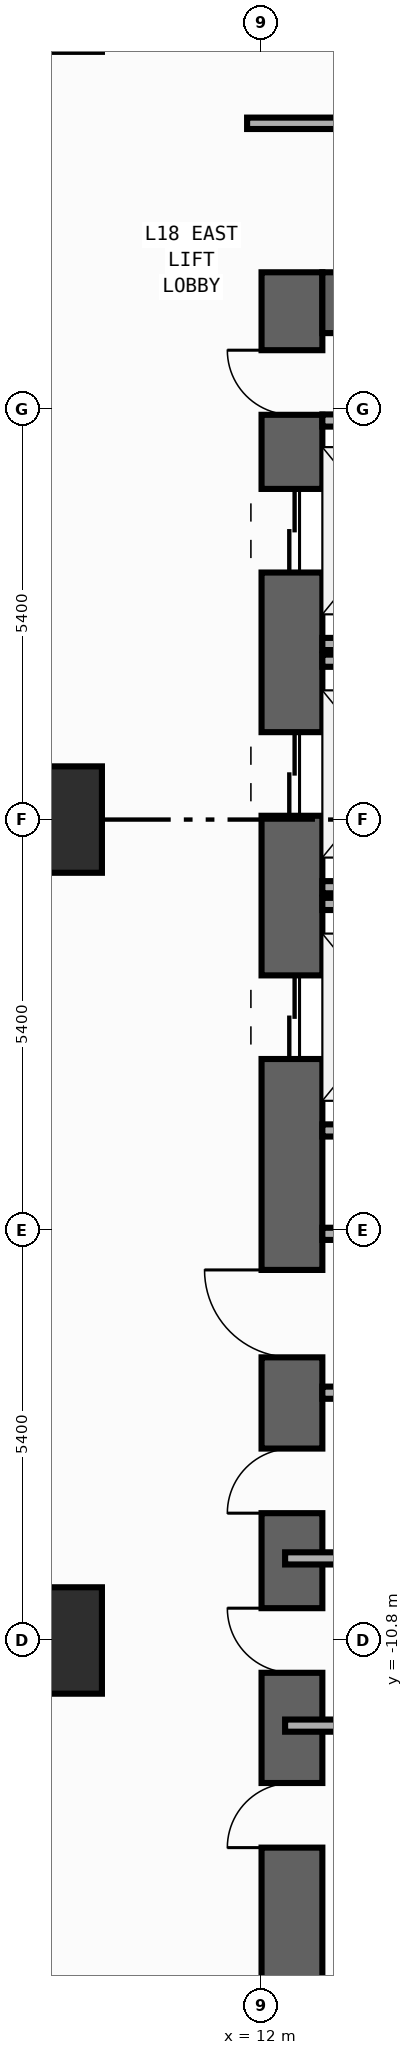
"""IFC4 building model, lengths in metres.
Left out: names, types, materials, properties, quantities, classifications, styles, units other than length and angle.
Written with IfcOpenShell. Run it as: python <this file> out.ifc"""

import sys

from ifc_helpers import new_model, si_unit, direction, frame, frame_2d, origin, origin_2d, place, context, subcontext, project, spatial, rectangle, extrude, element, fill, save


model = new_model("IFC4")
c1 = context("Model", 3, precision=1e-05, world=origin(), true_north=direction((0.0, 1.0)))
c2 = subcontext(c1, "Body", "Model", "MODEL_VIEW")
j1 = project(units=[si_unit("LENGTHUNIT", "METRE"), si_unit("PLANEANGLEUNIT", "RADIAN")], contexts=[c1])
p1 = place(None, origin())
s1 = spatial("IfcSite", under=j1, at=p1, CompositionType="ELEMENT")
p2 = place(p1, origin())
s2 = spatial("IfcBuilding", under=s1, at=p2, CompositionType="ELEMENT")
p3 = place(p2, frame((0.0, 0.0, 76.4)))
s3 = spatial("IfcBuildingStorey", under=s2, at=p3, CompositionType="ELEMENT", Elevation=76.4)
p4 = place(p3, frame((12.4, -19.8, 0.0), z_axis=(0.0, 0.0, 1.0), x_axis=(0.0, 1.0, 0.0)))
e1 = element("IfcWall", 1, at=p4, inside=s3, PredefinedType="SHEAR", context=c2, shape_type="SweptSolid", body=[
    extrude(rectangle(XDim=27.0, YDim=0.8, at=frame_2d((13.5, 0.0))), origin(), (0.0, 0.0, 1.0), 3.94),
])
p5 = place(p4, frame((23.05, 0.0, 0.0)))
e2 = element("IfcOpeningElement", 2, at=p5, cuts=e1, PredefinedType="OPENING", context=c2, shape_type="SweptSolid", body=[
    extrude(rectangle(XDim=1.1, YDim=2.2, at=frame_2d((0.55, 1.1))), frame((0.0, 0.41, 0.0), z_axis=(0.0, -1.0, 0.0), x_axis=(1.0, 0.0, 0.0)), (0.0, 0.0, 1.0), 0.82),
])
p6 = place(p4, frame((19.85, 0.0, 0.0)))
e3 = element("IfcOpeningElement", 3, at=p6, cuts=e1, PredefinedType="OPENING", context=c2, shape_type="SweptSolid", body=[
    extrude(rectangle(XDim=1.1, YDim=2.2, at=frame_2d((0.55, 1.1))), frame((0.0, 0.41, 0.0), z_axis=(0.0, -1.0, 0.0), x_axis=(1.0, 0.0, 0.0)), (0.0, 0.0, 1.0), 0.82),
])
p7 = place(p4, frame((16.65, 0.0, 0.0)))
e4 = element("IfcOpeningElement", 4, at=p7, cuts=e1, PredefinedType="OPENING", context=c2, shape_type="SweptSolid", body=[
    extrude(rectangle(XDim=1.1, YDim=2.2, at=frame_2d((0.55, 1.1))), frame((0.0, 0.41, 0.0), z_axis=(0.0, -1.0, 0.0), x_axis=(1.0, 0.0, 0.0)), (0.0, 0.0, 1.0), 0.82),
])
p8 = place(p4, frame((6.275, 0.0, 0.0)))
e5 = element("IfcOpeningElement", 5, at=p8, cuts=e1, PredefinedType="OPENING", context=c2, shape_type="SweptSolid", body=[
    extrude(rectangle(XDim=0.85, YDim=2.1, at=frame_2d((0.425, 1.05))), frame((0.0, 0.41, 0.0), z_axis=(0.0, -1.0, 0.0), x_axis=(1.0, 0.0, 0.0)), (0.0, 0.0, 1.0), 0.82),
])
p9 = place(p4, frame((8.575, 0.0, 0.0)))
e6 = element("IfcOpeningElement", 6, at=p9, cuts=e1, PredefinedType="OPENING", context=c2, shape_type="SweptSolid", body=[
    extrude(rectangle(XDim=0.85, YDim=2.1, at=frame_2d((0.425, 1.05))), frame((0.0, 0.41, 0.0), z_axis=(0.0, -1.0, 0.0), x_axis=(1.0, 0.0, 0.0)), (0.0, 0.0, 1.0), 0.82),
])
p10 = place(p4, frame((10.675, 0.0, 0.0)))
e7 = element("IfcOpeningElement", 7, at=p10, cuts=e1, PredefinedType="OPENING", context=c2, shape_type="SweptSolid", body=[
    extrude(rectangle(XDim=0.85, YDim=2.1, at=frame_2d((0.425, 1.05))), frame((0.0, 0.41, 0.0), z_axis=(0.0, -1.0, 0.0), x_axis=(1.0, 0.0, 0.0)), (0.0, 0.0, 1.0), 0.82),
])
p11 = place(p4, frame((12.725, 0.0, 0.0)))
e8 = element("IfcOpeningElement", 8, at=p11, cuts=e1, PredefinedType="OPENING", context=c2, shape_type="SweptSolid", body=[
    extrude(rectangle(XDim=1.15, YDim=2.2, at=frame_2d((0.575, 1.1))), frame((0.0, 0.41, 0.0), z_axis=(0.0, -1.0, 0.0), x_axis=(1.0, 0.0, 0.0)), (0.0, 0.0, 1.0), 0.82),
])
p12 = place(p4, frame((25.125, 0.0, 0.0)))
e9 = element("IfcOpeningElement", 9, at=p12, cuts=e1, PredefinedType="OPENING", context=c2, shape_type="SweptSolid", body=[
    extrude(rectangle(XDim=0.85, YDim=2.1, at=frame_2d((0.425, 1.05))), frame((0.0, 0.41, 0.0), z_axis=(0.0, -1.0, 0.0), x_axis=(1.0, 0.0, 0.0)), (0.0, 0.0, 1.0), 0.82),
])
p13 = place(p3, frame((12.8, 6.8, 0.0), z_axis=(0.0, 0.0, 1.0), x_axis=(1.0, 0.0, 0.0)))
e10 = element("IfcWall", 10, at=p13, inside=s3, PredefinedType="SHEAR", context=c2, shape_type="SweptSolid", body=[
    extrude(rectangle(XDim=6.8, YDim=0.8, at=frame_2d((3.4, 0.0))), origin(), (0.0, 0.0, 1.0), 3.94),
])
for number, where, z_axis, x_axis in (
    (11, (9.2, -10.8, 0.0), (0.0, 0.0, 1.0), (1.0, 0.0, 0.0)),
    (12, (9.2, 0.0, 0.0), (0.0, 0.0, 1.0), (1.0, 0.0, 0.0)),
):
    element("IfcColumn", number, at=place(p3, frame(where, z_axis=z_axis, x_axis=x_axis)), inside=s3, PredefinedType="COLUMN", context=c2, shape_type="SweptSolid", body=[
        extrude(rectangle(XDim=1.4, YDim=1.4, at=origin_2d()), origin(), (0.0, 0.0, 1.0), 4.2),
    ])
for number, where, z_axis, x_axis in (
    (13, (12.8, 2.31, 0.0), (0.0, 0.0, 1.0), (1.0, 0.0, 0.0)),
    (14, (12.8, -0.89, 0.0), (0.0, 0.0, 1.0), (1.0, 0.0, 0.0)),
    (15, (12.8, 2.09, 0.0), (0.0, 0.0, 1.0), (1.0, 0.0, 0.0)),
    (16, (12.8, -4.09, 0.0), (0.0, 0.0, 1.0), (1.0, 0.0, 0.0)),
    (17, (12.8, -1.11, 0.0), (0.0, 0.0, 1.0), (1.0, 0.0, 0.0)),
):
    element("IfcWall", number, at=place(p3, frame(where, z_axis=z_axis, x_axis=x_axis)), inside=s3, PredefinedType="STANDARD", context=c2, shape_type="SweptSolid", body=[
        extrude(rectangle(XDim=2.19, YDim=0.16, at=frame_2d((1.095, 0.0))), origin(), (0.0, 0.0, 1.0), 3.94),
    ])
for number, where, z_axis, x_axis in (
    (18, (12.8, -5.45, 0.0), (0.0, 0.0, 1.0), (1.0, 0.0, 0.0)),
    (19, (12.8, -7.54, 0.0), (0.0, 0.0, 1.0), (1.0, 0.0, 0.0)),
    (20, (12.8, 5.25, 0.0), (0.0, 0.0, 1.0), (1.0, 0.0, 0.0)),
):
    element("IfcWall", number, at=place(p3, frame(where, z_axis=z_axis, x_axis=x_axis)), inside=s3, PredefinedType="STANDARD", context=c2, shape_type="SweptSolid", body=[
        extrude(rectangle(XDim=2.6, YDim=0.16, at=frame_2d((1.3, 0.0))), origin(), (0.0, 0.0, 1.0), 3.94),
    ])
for number, where, z_axis, x_axis in (
    (21, (12.31, -11.92, 0.0), (0.0, 0.0, 1.0), (1.0, 0.0, 0.0)),
    (22, (12.31, -9.72, 0.0), (0.0, 0.0, 1.0), (1.0, 0.0, 0.0)),
):
    element("IfcWall", number, at=place(p3, frame(where, z_axis=z_axis, x_axis=x_axis)), inside=s3, PredefinedType="PARTITIONING", context=c2, shape_type="SweptSolid", body=[
        extrude(rectangle(XDim=3.065, YDim=0.16, at=frame_2d((1.532, 0.0))), origin(), (0.0, 0.0, 1.0), 3.94),
    ])
p14 = place(p3, frame((11.81, 9.16, 0.0), z_axis=(0.0, 0.0, 1.0), x_axis=(1.0, 0.0, 0.0)))
e23 = element("IfcWall", 23, at=p14, inside=s3, PredefinedType="PARTITIONING", context=c2, shape_type="SweptSolid", body=[
    extrude(rectangle(XDim=8.83, YDim=0.15, at=frame_2d((4.415, 0.0))), origin(), (0.0, 0.0, 1.0), 3.94),
])
p15 = place(p14, frame((5.067, 0.0, 0.0)))
e24 = element("IfcOpeningElement", 24, at=p15, cuts=e23, PredefinedType="OPENING", context=c2, shape_type="SweptSolid", body=[
    extrude(rectangle(XDim=0.9, YDim=2.15, at=frame_2d((0.45, 1.075))), frame((0.0, 0.085, 0.0), z_axis=(0.0, -1.0, 0.0), x_axis=(1.0, 0.0, 0.0)), (0.0, 0.0, 1.0), 0.17),
])
p16 = place(p5, origin())
e25 = element("IfcDoor", 25, at=p16, inside=s3, OperationType="DOUBLE_DOOR_SLIDING", PredefinedType="DOOR", context=c2, shape_type="SweptSolid", body=[
    extrude(rectangle(XDim=1.1, YDim=2.2, at=frame_2d((0.55, 1.1))), frame((0.0, 0.025, 0.0), z_axis=(0.0, -1.0, 0.0), x_axis=(1.0, 0.0, 0.0)), (0.0, 0.0, 1.0), 0.05),
])
fill(e2, e25)
p17 = place(p6, origin())
e26 = element("IfcDoor", 26, at=p17, inside=s3, OperationType="DOUBLE_DOOR_SLIDING", PredefinedType="DOOR", context=c2, shape_type="SweptSolid", body=[
    extrude(rectangle(XDim=1.1, YDim=2.2, at=frame_2d((0.55, 1.1))), frame((0.0, 0.025, 0.0), z_axis=(0.0, -1.0, 0.0), x_axis=(1.0, 0.0, 0.0)), (0.0, 0.0, 1.0), 0.05),
])
fill(e3, e26)
p18 = place(p7, origin())
e27 = element("IfcDoor", 27, at=p18, inside=s3, OperationType="DOUBLE_DOOR_SLIDING", PredefinedType="DOOR", context=c2, shape_type="SweptSolid", body=[
    extrude(rectangle(XDim=1.1, YDim=2.2, at=frame_2d((0.55, 1.1))), frame((0.0, 0.025, 0.0), z_axis=(0.0, -1.0, 0.0), x_axis=(1.0, 0.0, 0.0)), (0.0, 0.0, 1.0), 0.05),
])
fill(e4, e27)
p19 = place(p8, origin())
e28 = element("IfcDoor", 28, at=p19, inside=s3, OperationType="SINGLE_SWING_LEFT", PredefinedType="DOOR", context=c2, shape_type="SweptSolid", body=[
    extrude(rectangle(XDim=0.85, YDim=2.1, at=frame_2d((0.425, 1.05))), frame((0.0, 0.025, 0.0), z_axis=(0.0, -1.0, 0.0), x_axis=(1.0, 0.0, 0.0)), (0.0, 0.0, 1.0), 0.05),
])
fill(e5, e28)
p20 = place(p9, origin())
e29 = element("IfcDoor", 29, at=p20, inside=s3, OperationType="SINGLE_SWING_RIGHT", PredefinedType="DOOR", context=c2, shape_type="SweptSolid", body=[
    extrude(rectangle(XDim=0.85, YDim=2.1, at=frame_2d((0.425, 1.05))), frame((0.0, 0.025, 0.0), z_axis=(0.0, -1.0, 0.0), x_axis=(1.0, 0.0, 0.0)), (0.0, 0.0, 1.0), 0.05),
])
fill(e6, e29)
p21 = place(p10, origin())
e30 = element("IfcDoor", 30, at=p21, inside=s3, OperationType="SINGLE_SWING_LEFT", PredefinedType="DOOR", context=c2, shape_type="SweptSolid", body=[
    extrude(rectangle(XDim=0.85, YDim=2.1, at=frame_2d((0.425, 1.05))), frame((0.0, 0.025, 0.0), z_axis=(0.0, -1.0, 0.0), x_axis=(1.0, 0.0, 0.0)), (0.0, 0.0, 1.0), 0.05),
])
fill(e7, e30)
p22 = place(p11, origin())
e31 = element("IfcDoor", 31, at=p22, inside=s3, OperationType="SINGLE_SWING_RIGHT", PredefinedType="DOOR", context=c2, shape_type="SweptSolid", body=[
    extrude(rectangle(XDim=1.15, YDim=2.2, at=frame_2d((0.575, 1.1))), frame((0.0, 0.025, 0.0), z_axis=(0.0, -1.0, 0.0), x_axis=(1.0, 0.0, 0.0)), (0.0, 0.0, 1.0), 0.05),
])
fill(e8, e31)
p23 = place(p12, origin())
e32 = element("IfcDoor", 32, at=p23, inside=s3, OperationType="SINGLE_SWING_RIGHT", PredefinedType="DOOR", context=c2, shape_type="SweptSolid", body=[
    extrude(rectangle(XDim=0.85, YDim=2.1, at=frame_2d((0.425, 1.05))), frame((0.0, 0.025, 0.0), z_axis=(0.0, -1.0, 0.0), x_axis=(1.0, 0.0, 0.0)), (0.0, 0.0, 1.0), 0.05),
])
fill(e9, e32)
save(model, sys.argv[1])
